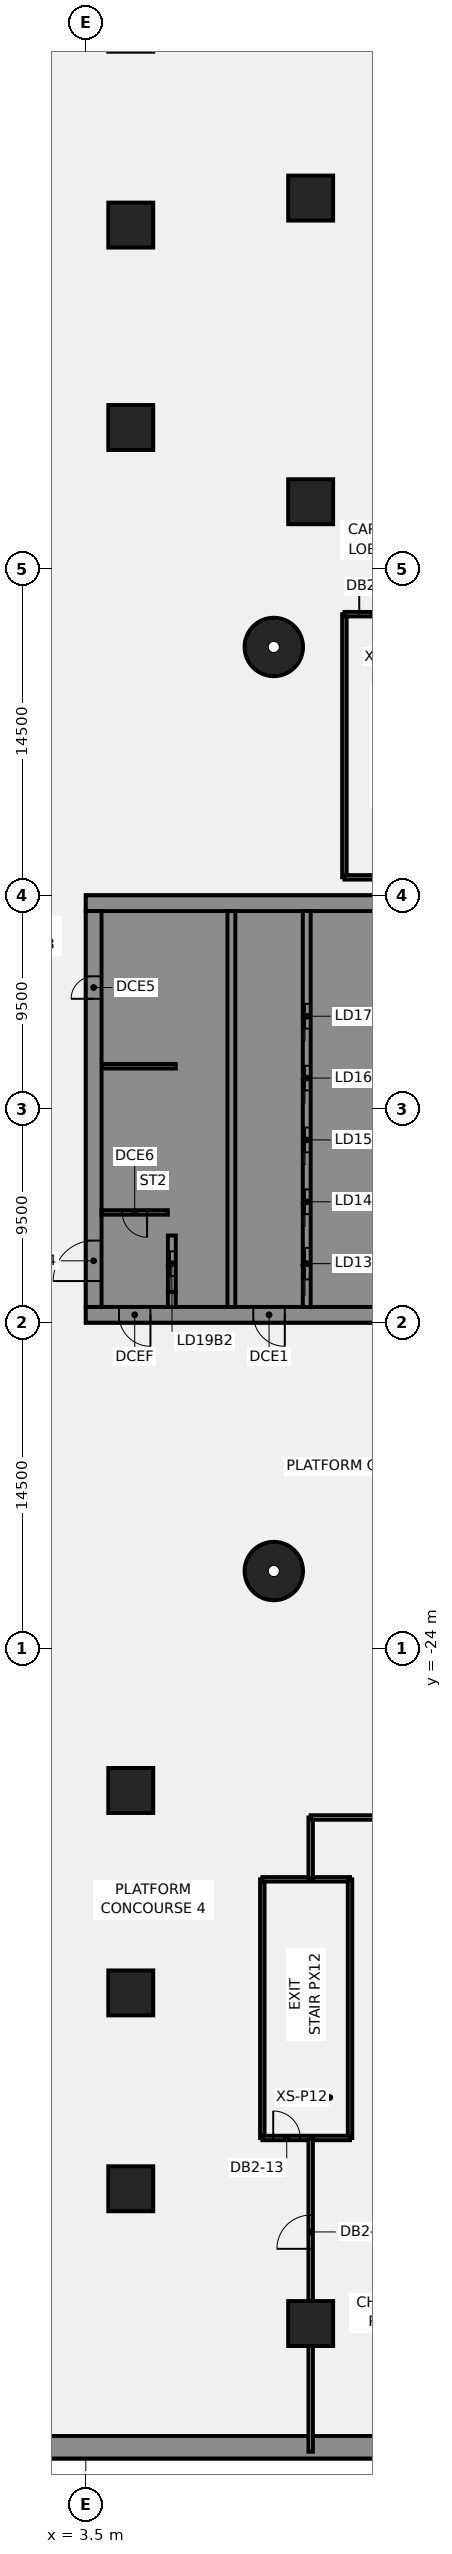
"""IFC4 building model, lengths in metres.
Left out: names, types, materials, properties, quantities, classifications, styles, units other than length and angle.
Written with IfcOpenShell. Run it as: python <this file> out.ifc"""

import sys

from ifc_helpers import new_model, si_unit, direction, frame, frame_2d, origin, origin_2d, place, context, subcontext, project, spatial, polyline, rectangle, circle, outline, extrude, element, fill, save


model = new_model("IFC4")
c1 = context("Model", 3, precision=1e-05, world=origin(), true_north=direction((0.0, 1.0)))
c2 = subcontext(c1, "Body", "Model", "MODEL_VIEW")
j1 = project(units=[si_unit("LENGTHUNIT", "METRE"), si_unit("PLANEANGLEUNIT", "RADIAN")], contexts=[c1])
p1 = place(None, origin())
s1 = spatial("IfcSite", under=j1, at=p1, CompositionType="ELEMENT")
p2 = place(p1, origin())
s2 = spatial("IfcBuilding", under=s1, at=p2, CompositionType="ELEMENT")
p3 = place(p2, frame((0.0, 0.0, -14.0)))
s3 = spatial("IfcBuildingStorey", under=s2, at=p3, CompositionType="ELEMENT", Elevation=-14.0)
p4 = place(p3, frame((63.931, -59.5, -0.45), z_axis=(0.0, 0.0, 1.0), x_axis=(-1.0, 0.0, 0.0)))
e1 = element("IfcWall", 1, at=p4, inside=s3, PredefinedType="SOLIDWALL", context=c2, shape_type="SweptSolid", body=[
    extrude(rectangle(XDim=127.863, YDim=1.0, at=frame_2d((63.931, 0.0))), origin(), (0.0, 0.0, 1.0), 7.0),
])
for number, where, z_axis, x_axis in (
    (2, (11.86, 20.543, -0.45), (0.0, 0.0, 1.0), (1.0, 0.0, 0.0)),
    (3, (11.86, -20.543, -0.45), (0.0, 0.0, 1.0), (1.0, 0.0, 0.0)),
):
    element("IfcColumn", number, at=place(p3, frame(where, z_axis=z_axis, x_axis=x_axis)), inside=s3, PredefinedType="COLUMN", context=c2, shape_type="SweptSolid", body=[
        extrude(circle(Radius=1.3, at=origin_2d()), origin(), (0.0, 0.0, 1.0), 7.0),
    ])
for number, where, z_axis, x_axis in (
    (4, (5.5, 39.3, -0.45), (0.0, 0.0, 1.0), (1.0, 0.0, 0.0)),
    (5, (5.5, 30.3, -0.45), (0.0, 0.0, 1.0), (1.0, 0.0, 0.0)),
    (6, (5.5, -39.3, -0.45), (0.0, 0.0, 1.0), (1.0, 0.0, 0.0)),
    (7, (5.5, -30.3, -0.45), (0.0, 0.0, 1.0), (1.0, 0.0, 0.0)),
    (8, (5.5, -48.008, -0.45), (0.0, 0.0, 1.0), (1.0, 0.0, 0.0)),
    (9, (13.5, -54.0, -0.45), (0.0, 0.0, 1.0), (1.0, 0.0, 0.0)),
    (10, (13.5, 27.0, -0.45), (0.0, 0.0, 1.0), (1.0, 0.0, 0.0)),
    (11, (13.5, 40.5, -0.45), (0.0, 0.0, 1.0), (1.0, 0.0, 0.0)),
):
    element("IfcColumn", number, at=place(p3, frame(where, z_axis=z_axis, x_axis=x_axis)), inside=s3, PredefinedType="COLUMN", context=c2, shape_type="SweptSolid", body=[
        extrude(rectangle(XDim=2.0, YDim=2.0, at=origin_2d()), origin(), (0.0, 0.0, 1.0), 7.0),
    ])
p5 = place(p3, frame((11.35, -45.75, 0.0), z_axis=(0.0, 0.0, 1.0), x_axis=(0.0, 1.0, 0.0)))
e12 = element("IfcWall", 12, at=p5, inside=s3, PredefinedType="PARTITIONING", context=c2, shape_type="SweptSolid", body=[
    extrude(rectangle(XDim=11.5, YDim=0.2, at=frame_2d((5.75, 0.0))), origin(), (0.0, 0.0, 1.0), 6.55),
])
p6 = place(p3, frame((11.35, -34.25, 0.0), z_axis=(0.0, 0.0, 1.0), x_axis=(1.0, 0.0, 0.0)))
e13 = element("IfcWall", 13, at=p6, inside=s3, PredefinedType="PARTITIONING", context=c2, shape_type="SweptSolid", body=[
    extrude(rectangle(XDim=3.9, YDim=0.2, at=frame_2d((1.95, 0.0))), origin(), (0.0, 0.0, 1.0), 6.55),
])
p7 = place(p3, frame((15.25, -45.75, 0.0), z_axis=(0.0, 0.0, 1.0), x_axis=(0.0, 1.0, 0.0)))
e14 = element("IfcWall", 14, at=p7, inside=s3, PredefinedType="PARTITIONING", context=c2, shape_type="SweptSolid", body=[
    extrude(rectangle(XDim=11.5, YDim=0.2, at=frame_2d((5.75, 0.0))), origin(), (0.0, 0.0, 1.0), 6.55),
])
p8 = place(p3, frame((11.35, -45.75, 0.0), z_axis=(0.0, 0.0, 1.0), x_axis=(1.0, 0.0, 0.0)))
e15 = element("IfcWall", 15, at=p8, inside=s3, PredefinedType="PARTITIONING", context=c2, shape_type="SweptSolid", body=[
    extrude(rectangle(XDim=3.9, YDim=0.2, at=frame_2d((1.95, 0.0))), origin(), (0.0, 0.0, 1.0), 6.55),
])
p9 = place(p8, frame((0.485, 0.0, 0.0)))
e16 = element("IfcOpeningElement", 16, at=p9, cuts=e15, PredefinedType="OPENING", context=c2, shape_type="SweptSolid", body=[
    extrude(rectangle(XDim=1.2, YDim=2.1, at=frame_2d((0.6, 1.05))), frame((0.0, 0.11, 0.0), z_axis=(0.0, -1.0, 0.0), x_axis=(1.0, 0.0, 0.0)), (0.0, 0.0, 1.0), 0.22),
])
p10 = place(p3, frame((15.0, 10.3, 0.0), z_axis=(0.0, 0.0, 1.0), x_axis=(0.0, 1.0, 0.0)))
e17 = element("IfcWall", 17, at=p10, inside=s3, PredefinedType="PARTITIONING", context=c2, shape_type="SweptSolid", body=[
    extrude(rectangle(XDim=11.7, YDim=0.2, at=frame_2d((5.85, 0.0))), origin(), (0.0, 0.0, 1.0), 6.55),
])
p11 = place(p3, frame((15.0, 22.0, 0.0), z_axis=(0.0, 0.0, 1.0), x_axis=(1.0, 0.0, 0.0)))
e18 = element("IfcWall", 18, at=p11, inside=s3, PredefinedType="PARTITIONING", context=c2, shape_type="SweptSolid", body=[
    extrude(rectangle(XDim=4.1, YDim=0.2, at=frame_2d((2.05, 0.0))), origin(), (0.0, 0.0, 1.0), 6.55),
])
p12 = place(p11, frame((0.66, 0.0, 0.0)))
e19 = element("IfcOpeningElement", 19, at=p12, cuts=e18, PredefinedType="OPENING", context=c2, shape_type="SweptSolid", body=[
    extrude(rectangle(XDim=1.2, YDim=2.1, at=frame_2d((0.6, 1.05))), frame((0.0, 0.11, 0.0), z_axis=(0.0, -1.0, 0.0), x_axis=(1.0, 0.0, 0.0)), (0.0, 0.0, 1.0), 0.22),
])
p13 = place(p3, frame((15.0, 10.3, 0.0), z_axis=(0.0, 0.0, 1.0), x_axis=(1.0, 0.0, 0.0)))
e20 = element("IfcWall", 20, at=p13, inside=s3, PredefinedType="PARTITIONING", context=c2, shape_type="SweptSolid", body=[
    extrude(rectangle(XDim=4.1, YDim=0.2, at=frame_2d((2.05, 0.0))), origin(), (0.0, 0.0, 1.0), 6.55),
])
p14 = place(p3, frame((13.5, -59.699, 0.0), z_axis=(0.0, 0.0, 1.0), x_axis=(0.0, 1.0, 0.0)))
e21 = element("IfcWall", 21, at=p14, inside=s3, PredefinedType="PARTITIONING", context=c2, shape_type="SweptSolid", body=[
    extrude(rectangle(XDim=13.919, YDim=0.2, at=frame_2d((6.959, 0.0))), origin(), (0.0, 0.0, 1.0), 6.55),
])
p15 = place(p14, frame((9.022, 0.0, 0.0)))
e22 = element("IfcOpeningElement", 22, at=p15, cuts=e21, PredefinedType="OPENING", context=c2, shape_type="SweptSolid", body=[
    extrude(rectangle(XDim=1.5, YDim=2.1, at=frame_2d((0.75, 1.05))), frame((0.0, 0.11, 0.0), z_axis=(0.0, -1.0, 0.0), x_axis=(1.0, 0.0, 0.0)), (0.0, 0.0, 1.0), 0.22),
])
p16 = place(p3, frame((13.5, -34.22, 0.0), z_axis=(0.0, 0.0, 1.0), x_axis=(0.0, 1.0, 0.0)))
e23 = element("IfcWall", 23, at=p16, inside=s3, PredefinedType="PARTITIONING", context=c2, shape_type="SweptSolid", body=[
    extrude(rectangle(XDim=2.72, YDim=0.2, at=frame_2d((1.36, 0.0))), origin(), (0.0, 0.0, 1.0), 6.55),
])
p17 = place(p3, frame((13.5, -31.5, 0.0), z_axis=(0.0, 0.0, 1.0), x_axis=(1.0, 0.0, 0.0)))
e24 = element("IfcWall", 24, at=p17, inside=s3, PredefinedType="PARTITIONING", context=c2, shape_type="SweptSolid", body=[
    extrude(rectangle(XDim=30.47, YDim=0.2, at=frame_2d((15.235, 0.0))), origin(), (0.0, 0.0, 1.0), 6.55),
])
p18 = place(p17, frame((17.25, 0.0, 0.0)))
e25 = element("IfcOpeningElement", 25, at=p18, cuts=e24, PredefinedType="OPENING", context=c2, shape_type="SweptSolid", body=[
    extrude(rectangle(XDim=1.5, YDim=2.1, at=frame_2d((0.75, 1.05))), frame((0.0, 0.11, 0.0), z_axis=(0.0, -1.0, 0.0), x_axis=(1.0, 0.0, 0.0)), (0.0, 0.0, 1.0), 0.22),
])
p19 = place(p3, frame((16.5, -9.15, 0.0), z_axis=(0.0, 0.0, 1.0), x_axis=(-1.0, 0.0, 0.0)))
e26 = element("IfcWall", 26, at=p19, inside=s3, PredefinedType="SHEAR", context=c2, shape_type="SweptSolid", body=[
    extrude(rectangle(XDim=13.0, YDim=0.7, at=frame_2d((6.5, 0.0))), origin(), (0.0, 0.0, 1.0), 6.55),
])
p20 = place(p19, frame((4.15, 0.0, 0.0)))
e27 = element("IfcOpeningElement", 27, at=p20, cuts=e26, PredefinedType="OPENING", context=c2, shape_type="SweptSolid", body=[
    extrude(rectangle(XDim=1.4, YDim=2.1, at=frame_2d((0.7, 1.05))), frame((0.0, 0.36, 0.0), z_axis=(0.0, -1.0, 0.0), x_axis=(1.0, 0.0, 0.0)), (0.0, 0.0, 1.0), 0.72),
])
p21 = place(p19, frame((10.125, 0.0, 0.0)))
e28 = element("IfcOpeningElement", 28, at=p21, cuts=e26, PredefinedType="OPENING", context=c2, shape_type="SweptSolid", body=[
    extrude(rectangle(XDim=1.4, YDim=2.1, at=frame_2d((0.7, 1.05))), frame((0.0, 0.36, 0.0), z_axis=(0.0, -1.0, 0.0), x_axis=(1.0, 0.0, 0.0)), (0.0, 0.0, 1.0), 0.72),
])
p22 = place(p3, origin())
e29 = element("IfcWall", 29, at=p22, inside=s3, PredefinedType="SHEAR", context=c2, shape_type="SweptSolid", body=[
    extrude(outline(polyline([(13.5, -8.8), (15.8, -8.8), (16.5, -8.8), (16.5, 8.8), (15.8, 8.8), (13.5, 8.8), (13.5, 8.125), (15.8, 8.125), (15.8, 5.625), (13.5, 5.625), (13.5, 5.375), (15.8, 5.375), (15.8, 2.875), (13.5, 2.875), (13.5, 2.625), (15.8, 2.625), (15.8, 0.125), (13.5, 0.125), (13.5, -0.125), (15.8, -0.125), (15.8, -2.625), (13.5, -2.625), (13.5, -2.875), (15.8, -2.875), (15.8, -5.375), (13.5, -5.375), (13.5, -5.625), (15.8, -5.625), (15.8, -8.125), (13.5, -8.125), (13.5, -8.8)])), origin(), (0.0, 0.0, 1.0), 6.55),
])
p23 = place(p3, frame((16.5, 9.15, 0.0), z_axis=(0.0, 0.0, 1.0), x_axis=(-1.0, 0.0, 0.0)))
e30 = element("IfcWall", 30, at=p23, inside=s3, PredefinedType="SHEAR", context=c2, shape_type="SweptSolid", body=[
    extrude(rectangle(XDim=13.0, YDim=0.7, at=frame_2d((6.5, 0.0))), origin(), (0.0, 0.0, 1.0), 6.55),
])
p24 = place(p3, origin())
e31 = element("IfcWall", 31, at=p24, inside=s3, PredefinedType="SHEAR", context=c2, shape_type="SweptSolid", body=[
    extrude(outline(polyline([(9.8, -5.375), (7.5, -5.375), (7.5, -2.875), (9.8, -2.875), (9.8, -2.625), (7.5, -2.625), (7.5, -0.125), (9.8, -0.125), (9.8, 0.125), (7.5, 0.125), (7.5, 2.625), (9.8, 2.625), (9.8, 2.875), (7.5, 2.875), (7.5, 5.375), (9.8, 5.375), (9.8, 5.625), (7.5, 5.625), (7.5, 8.125), (9.8, 8.125), (9.8, 8.8), (7.5, 8.8), (7.15, 8.8), (7.15, -5.625), (7.5, -5.625), (9.8, -5.625), (9.8, -5.375)])), origin(), (0.0, 0.0, 1.0), 6.55),
])
p25 = place(p3, origin())
e32 = element("IfcWall", 32, at=p25, inside=s3, PredefinedType="SHEAR", context=c2, shape_type="SweptSolid", body=[
    extrude(outline(polyline([(7.5, -8.125), (7.5, -8.8), (9.8, -8.8), (9.8, -8.125), (9.8, -5.625), (9.55, -5.625), (9.55, -8.125), (7.5, -8.125)])), origin(), (0.0, 0.0, 1.0), 6.55),
])
p26 = place(p3, frame((7.325, -8.8, 0.0), z_axis=(0.0, 0.0, 1.0), x_axis=(0.0, 1.0, 0.0)))
e33 = element("IfcWall", 33, at=p26, inside=s3, PredefinedType="SHEAR", context=c2, shape_type="SweptSolid", body=[
    extrude(rectangle(XDim=0.675, YDim=0.35, at=frame_2d((0.337, 0.0))), origin(), (0.0, 0.0, 1.0), 6.55),
])
p27 = place(p3, frame((7.5, 1.9, 0.0), z_axis=(0.0, 0.0, 1.0), x_axis=(-1.0, 0.0, 0.0)))
e34 = element("IfcWall", 34, at=p27, inside=s3, PredefinedType="SHEAR", context=c2, shape_type="SweptSolid", body=[
    extrude(rectangle(XDim=3.3, YDim=0.2, at=frame_2d((1.65, 0.0))), origin(), (0.0, 0.0, 1.0), 6.55),
])
p28 = place(p3, frame((13.325, -8.8, 0.0), z_axis=(0.0, 0.0, 1.0), x_axis=(0.0, 1.0, 0.0)))
e35 = element("IfcWall", 35, at=p28, inside=s3, PredefinedType="SHEAR", context=c2, shape_type="SweptSolid", body=[
    extrude(rectangle(XDim=17.6, YDim=0.35, at=frame_2d((8.8, 0.0))), origin(), (0.0, 0.0, 1.0), 6.55),
])
p29 = place(p28, frame((1.225, 0.0, 0.0)))
e36 = element("IfcOpeningElement", 36, at=p29, cuts=e35, PredefinedType="OPENING", context=c2, shape_type="SweptSolid", body=[
    extrude(rectangle(XDim=1.4, YDim=2.1, at=frame_2d((0.7, 1.05))), frame((0.0, 0.185, 0.0), z_axis=(0.0, -1.0, 0.0), x_axis=(1.0, 0.0, 0.0)), (0.0, 0.0, 1.0), 0.37),
])
p30 = place(p28, frame((4.125, 0.0, 0.0)))
e37 = element("IfcOpeningElement", 37, at=p30, cuts=e35, PredefinedType="OPENING", context=c2, shape_type="SweptSolid", body=[
    extrude(rectangle(XDim=1.1, YDim=2.1, at=frame_2d((0.55, 1.05))), frame((0.0, 0.185, 0.0), z_axis=(0.0, -1.0, 0.0), x_axis=(1.0, 0.0, 0.0)), (0.0, 0.0, 1.0), 0.37),
])
p31 = place(p28, frame((6.875, 0.0, 0.0)))
e38 = element("IfcOpeningElement", 38, at=p31, cuts=e35, PredefinedType="OPENING", context=c2, shape_type="SweptSolid", body=[
    extrude(rectangle(XDim=1.1, YDim=2.1, at=frame_2d((0.55, 1.05))), frame((0.0, 0.185, 0.0), z_axis=(0.0, -1.0, 0.0), x_axis=(1.0, 0.0, 0.0)), (0.0, 0.0, 1.0), 0.37),
])
p32 = place(p28, frame((9.625, 0.0, 0.0)))
e39 = element("IfcOpeningElement", 39, at=p32, cuts=e35, PredefinedType="OPENING", context=c2, shape_type="SweptSolid", body=[
    extrude(rectangle(XDim=1.1, YDim=2.1, at=frame_2d((0.55, 1.05))), frame((0.0, 0.185, 0.0), z_axis=(0.0, -1.0, 0.0), x_axis=(1.0, 0.0, 0.0)), (0.0, 0.0, 1.0), 0.37),
])
p33 = place(p28, frame((12.375, 0.0, 0.0)))
e40 = element("IfcOpeningElement", 40, at=p33, cuts=e35, PredefinedType="OPENING", context=c2, shape_type="SweptSolid", body=[
    extrude(rectangle(XDim=1.1, YDim=2.1, at=frame_2d((0.55, 1.05))), frame((0.0, 0.185, 0.0), z_axis=(0.0, -1.0, 0.0), x_axis=(1.0, 0.0, 0.0)), (0.0, 0.0, 1.0), 0.37),
])
p34 = place(p3, frame((9.975, -8.8, 0.0), z_axis=(0.0, 0.0, 1.0), x_axis=(0.0, 1.0, 0.0)))
e41 = element("IfcWall", 41, at=p34, inside=s3, PredefinedType="SHEAR", context=c2, shape_type="SweptSolid", body=[
    extrude(rectangle(XDim=17.6, YDim=0.35, at=frame_2d((8.8, 0.0))), origin(), (0.0, 0.0, 1.0), 6.55),
])
p35 = place(p3, frame((7.325, -8.125, 0.0), z_axis=(0.0, 0.0, 1.0), x_axis=(0.0, 1.0, 0.0)))
e42 = element("IfcWall", 42, at=p35, inside=s3, PredefinedType="SHEAR", context=c2, shape_type="SweptSolid", body=[
    extrude(rectangle(XDim=2.5, YDim=0.35, at=frame_2d((1.25, 0.0))), origin(), (0.0, 0.0, 1.0), 6.55),
])
p36 = place(p35, frame((0.7, 0.0, 0.0)))
e43 = element("IfcOpeningElement", 43, at=p36, cuts=e42, PredefinedType="OPENING", context=c2, shape_type="SweptSolid", body=[
    extrude(rectangle(XDim=1.1, YDim=2.1, at=frame_2d((0.55, 1.05))), frame((0.0, 0.185, 0.0), z_axis=(0.0, -1.0, 0.0), x_axis=(1.0, 0.0, 0.0)), (0.0, 0.0, 1.0), 0.37),
])
p37 = place(p3, frame((3.85, -8.8, 0.0), z_axis=(0.0, 0.0, 1.0), x_axis=(0.0, 1.0, 0.0)))
e44 = element("IfcWall", 44, at=p37, inside=s3, PredefinedType="SHEAR", context=c2, shape_type="SweptSolid", body=[
    extrude(rectangle(XDim=17.6, YDim=0.7, at=frame_2d((8.8, 0.0))), origin(), (0.0, 0.0, 1.0), 6.55),
])
p38 = place(p37, frame((1.15, 0.0, 0.0)))
e45 = element("IfcOpeningElement", 45, at=p38, cuts=e44, PredefinedType="OPENING", context=c2, shape_type="SweptSolid", body=[
    extrude(rectangle(XDim=1.8, YDim=2.1, at=frame_2d((0.9, 1.05))), frame((0.0, 0.36, 0.0), z_axis=(0.0, -1.0, 0.0), x_axis=(1.0, 0.0, 0.0)), (0.0, 0.0, 1.0), 0.72),
])
p39 = place(p37, frame((13.7, 0.0, 0.0)))
e46 = element("IfcOpeningElement", 46, at=p39, cuts=e44, PredefinedType="OPENING", context=c2, shape_type="SweptSolid", body=[
    extrude(rectangle(XDim=1.0, YDim=2.1, at=frame_2d((0.5, 1.05))), frame((0.0, 0.36, 0.0), z_axis=(0.0, -1.0, 0.0), x_axis=(1.0, 0.0, 0.0)), (0.0, 0.0, 1.0), 0.72),
])
p40 = place(p3, frame((7.15, -4.6, 0.0), z_axis=(0.0, 0.0, 1.0), x_axis=(-1.0, 0.0, 0.0)))
e47 = element("IfcWall", 47, at=p40, inside=s3, PredefinedType="SHEAR", context=c2, shape_type="SweptSolid", body=[
    extrude(rectangle(XDim=2.95, YDim=0.2, at=frame_2d((1.475, 0.0))), origin(), (0.0, 0.0, 1.0), 6.55),
])
p41 = place(p40, frame((0.925, 0.0, 0.0)))
e48 = element("IfcOpeningElement", 48, at=p41, cuts=e47, PredefinedType="OPENING", context=c2, shape_type="SweptSolid", body=[
    extrude(rectangle(XDim=1.1, YDim=2.1, at=frame_2d((0.55, 1.05))), frame((0.0, 0.11, 0.0), z_axis=(0.0, -1.0, 0.0), x_axis=(1.0, 0.0, 0.0)), (0.0, 0.0, 1.0), 0.22),
])
p42 = place(p12, origin())
e49 = element("IfcDoor", 49, at=p42, inside=s3, OperationType="SINGLE_SWING_RIGHT", PredefinedType="DOOR", context=c2, shape_type="SweptSolid", body=[
    extrude(rectangle(XDim=1.2, YDim=2.1, at=frame_2d((0.6, 1.05))), frame((0.0, 0.025, 0.0), z_axis=(0.0, -1.0, 0.0), x_axis=(1.0, 0.0, 0.0)), (0.0, 0.0, 1.0), 0.05),
])
fill(e19, e49)
p43 = place(p9, origin())
e50 = element("IfcDoor", 50, at=p43, inside=s3, OperationType="SINGLE_SWING_LEFT", PredefinedType="DOOR", context=c2, shape_type="SweptSolid", body=[
    extrude(rectangle(XDim=1.2, YDim=2.1, at=frame_2d((0.6, 1.05))), frame((0.0, 0.025, 0.0), z_axis=(0.0, -1.0, 0.0), x_axis=(1.0, 0.0, 0.0)), (0.0, 0.0, 1.0), 0.05),
])
fill(e16, e50)
p44 = place(p15, origin())
e51 = element("IfcDoor", 51, at=p44, inside=s3, OperationType="SINGLE_SWING_RIGHT", PredefinedType="DOOR", context=c2, shape_type="SweptSolid", body=[
    extrude(rectangle(XDim=1.5, YDim=2.1, at=frame_2d((0.75, 1.05))), frame((0.0, 0.025, 0.0), z_axis=(0.0, -1.0, 0.0), x_axis=(1.0, 0.0, 0.0)), (0.0, 0.0, 1.0), 0.05),
])
fill(e22, e51)
p45 = place(p20, origin())
e52 = element("IfcDoor", 52, at=p45, inside=s3, OperationType="SINGLE_SWING_LEFT", PredefinedType="DOOR", context=c2, shape_type="SweptSolid", body=[
    extrude(rectangle(XDim=1.4, YDim=2.1, at=frame_2d((0.7, 1.05))), frame((0.0, 0.025, 0.0), z_axis=(0.0, -1.0, 0.0), x_axis=(1.0, 0.0, 0.0)), (0.0, 0.0, 1.0), 0.05),
])
fill(e27, e52)
p46 = place(p21, origin())
e53 = element("IfcDoor", 53, at=p46, inside=s3, OperationType="SINGLE_SWING_LEFT", PredefinedType="DOOR", context=c2, shape_type="SweptSolid", body=[
    extrude(rectangle(XDim=1.4, YDim=2.1, at=frame_2d((0.7, 1.05))), frame((0.0, 0.025, 0.0), z_axis=(0.0, -1.0, 0.0), x_axis=(1.0, 0.0, 0.0)), (0.0, 0.0, 1.0), 0.05),
])
fill(e28, e53)
p47 = place(p38, origin())
e54 = element("IfcDoor", 54, at=p47, inside=s3, OperationType="SINGLE_SWING_LEFT", PredefinedType="DOOR", context=c2, shape_type="SweptSolid", body=[
    extrude(rectangle(XDim=1.8, YDim=2.1, at=frame_2d((0.9, 1.05))), frame((0.0, 0.025, 0.0), z_axis=(0.0, -1.0, 0.0), x_axis=(1.0, 0.0, 0.0)), (0.0, 0.0, 1.0), 0.05),
])
fill(e45, e54)
p48 = place(p39, origin())
e55 = element("IfcDoor", 55, at=p48, inside=s3, OperationType="SINGLE_SWING_LEFT", PredefinedType="DOOR", context=c2, shape_type="SweptSolid", body=[
    extrude(rectangle(XDim=1.0, YDim=2.1, at=frame_2d((0.5, 1.05))), frame((0.0, 0.025, 0.0), z_axis=(0.0, -1.0, 0.0), x_axis=(1.0, 0.0, 0.0)), (0.0, 0.0, 1.0), 0.05),
])
fill(e46, e55)
p49 = place(p41, origin())
e56 = element("IfcDoor", 56, at=p49, inside=s3, OperationType="SINGLE_SWING_LEFT", PredefinedType="DOOR", context=c2, shape_type="SweptSolid", body=[
    extrude(rectangle(XDim=1.1, YDim=2.1, at=frame_2d((0.55, 1.05))), frame((0.0, 0.025, 0.0), z_axis=(0.0, -1.0, 0.0), x_axis=(1.0, 0.0, 0.0)), (0.0, 0.0, 1.0), 0.05),
])
fill(e48, e56)
p50 = place(p29, origin())
e57 = element("IfcDoor", 57, at=p50, inside=s3, OperationType="SLIDING_TO_LEFT", PredefinedType="DOOR", context=c2, shape_type="SweptSolid", body=[
    extrude(rectangle(XDim=1.4, YDim=2.1, at=frame_2d((0.7, 1.05))), frame((0.0, 0.025, 0.0), z_axis=(0.0, -1.0, 0.0), x_axis=(1.0, 0.0, 0.0)), (0.0, 0.0, 1.0), 0.05),
])
fill(e36, e57)
p51 = place(p30, origin())
e58 = element("IfcDoor", 58, at=p51, inside=s3, OperationType="SLIDING_TO_LEFT", PredefinedType="DOOR", context=c2, shape_type="SweptSolid", body=[
    extrude(rectangle(XDim=1.1, YDim=2.1, at=frame_2d((0.55, 1.05))), frame((0.0, 0.025, 0.0), z_axis=(0.0, -1.0, 0.0), x_axis=(1.0, 0.0, 0.0)), (0.0, 0.0, 1.0), 0.05),
])
fill(e37, e58)
p52 = place(p31, origin())
e59 = element("IfcDoor", 59, at=p52, inside=s3, OperationType="SLIDING_TO_LEFT", PredefinedType="DOOR", context=c2, shape_type="SweptSolid", body=[
    extrude(rectangle(XDim=1.1, YDim=2.1, at=frame_2d((0.55, 1.05))), frame((0.0, 0.025, 0.0), z_axis=(0.0, -1.0, 0.0), x_axis=(1.0, 0.0, 0.0)), (0.0, 0.0, 1.0), 0.05),
])
fill(e38, e59)
p53 = place(p32, origin())
e60 = element("IfcDoor", 60, at=p53, inside=s3, OperationType="SLIDING_TO_LEFT", PredefinedType="DOOR", context=c2, shape_type="SweptSolid", body=[
    extrude(rectangle(XDim=1.1, YDim=2.1, at=frame_2d((0.55, 1.05))), frame((0.0, 0.025, 0.0), z_axis=(0.0, -1.0, 0.0), x_axis=(1.0, 0.0, 0.0)), (0.0, 0.0, 1.0), 0.05),
])
fill(e39, e60)
p54 = place(p33, origin())
e61 = element("IfcDoor", 61, at=p54, inside=s3, OperationType="SLIDING_TO_LEFT", PredefinedType="DOOR", context=c2, shape_type="SweptSolid", body=[
    extrude(rectangle(XDim=1.1, YDim=2.1, at=frame_2d((0.55, 1.05))), frame((0.0, 0.025, 0.0), z_axis=(0.0, -1.0, 0.0), x_axis=(1.0, 0.0, 0.0)), (0.0, 0.0, 1.0), 0.05),
])
fill(e40, e61)
p55 = place(p36, origin())
e62 = element("IfcDoor", 62, at=p55, inside=s3, OperationType="SLIDING_TO_LEFT", PredefinedType="DOOR", context=c2, shape_type="SweptSolid", body=[
    extrude(rectangle(XDim=1.1, YDim=2.1, at=frame_2d((0.55, 1.05))), frame((0.0, 0.025, 0.0), z_axis=(0.0, -1.0, 0.0), x_axis=(1.0, 0.0, 0.0)), (0.0, 0.0, 1.0), 0.05),
])
fill(e43, e62)
save(model, sys.argv[1])
